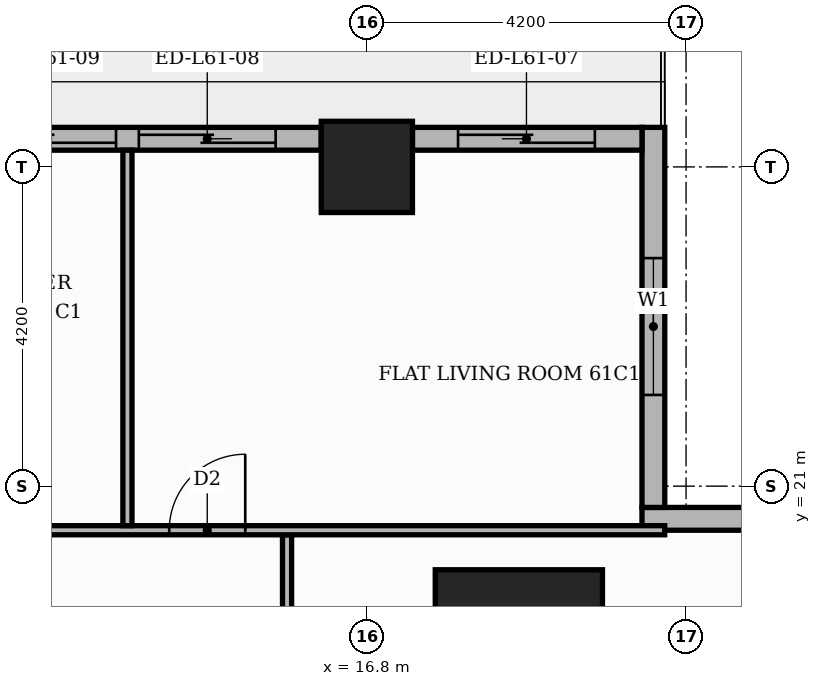
"""IFC4 building model, lengths in metres.
Left out: names, types, materials, properties, quantities, classifications, styles, units other than length and angle.
Written with IfcOpenShell. Run it as: python <this file> out.ifc"""

import sys

from ifc_helpers import new_model, si_unit, direction, frame, frame_2d, origin, origin_2d, place, context, subcontext, project, spatial, rectangle, extrude, element, fill, save


model = new_model("IFC4")
c1 = context("Model", 3, precision=1e-05, world=origin(), true_north=direction((0.0, 1.0)))
c2 = subcontext(c1, "Body", "Model", "MODEL_VIEW")
j1 = project(units=[si_unit("LENGTHUNIT", "METRE"), si_unit("PLANEANGLEUNIT", "RADIAN")], contexts=[c1])
p1 = place(None, origin())
s1 = spatial("IfcSite", under=j1, at=p1, CompositionType="ELEMENT")
p2 = place(p1, origin())
s2 = spatial("IfcBuilding", under=s1, at=p2, CompositionType="ELEMENT")
p3 = place(p2, frame((0.0, 0.0, 256.2)))
s3 = spatial("IfcBuildingStorey", under=s2, at=p3, CompositionType="ELEMENT", Elevation=256.2)
p4 = place(p3, frame((18.8, 18.8, 0.0), z_axis=(0.0, 0.0, 1.0), x_axis=(1.0, 0.0, 0.0)))
e1 = element("IfcColumn", 1, at=p4, inside=s3, PredefinedType="COLUMN", context=c2, shape_type="SweptSolid", body=[
    extrude(rectangle(XDim=2.2, YDim=2.2, at=origin_2d()), origin(), (0.0, 0.0, 1.0), 3.9),
])
p5 = place(p3, frame((16.8, 25.2, 0.0), z_axis=(0.0, 0.0, 1.0), x_axis=(1.0, 0.0, 0.0)))
e2 = element("IfcColumn", 2, at=p5, inside=s3, PredefinedType="COLUMN", context=c2, shape_type="SweptSolid", body=[
    extrude(rectangle(XDim=1.2, YDim=1.2, at=origin_2d()), origin(), (0.0, 0.0, 1.0), 3.9),
])
p6 = place(p3, frame((25.42, 20.57, 0.0), z_axis=(0.0, 0.0, 1.0), x_axis=(-1.0, 0.0, 0.0)))
e3 = element("IfcWall", 3, at=p6, inside=s3, PredefinedType="STANDARD", context=c2, shape_type="SweptSolid", body=[
    extrude(rectangle(XDim=5.0, YDim=0.3, at=frame_2d((2.5, 0.0))), origin(), (0.0, 0.0, 1.0), 3.48),
])
p7 = place(p6, frame((1.42, 0.0, 0.9)))
e4 = element("IfcOpeningElement", 4, at=p7, cuts=e3, PredefinedType="OPENING", context=c2, shape_type="SweptSolid", body=[
    extrude(rectangle(XDim=1.8, YDim=2.1, at=frame_2d((0.9, 1.05))), frame((0.0, 0.16, 0.0), z_axis=(0.0, -1.0, 0.0), x_axis=(1.0, 0.0, 0.0)), (0.0, 0.0, 1.0), 0.32),
])
p8 = place(p3, frame((20.57, 20.72, 0.0), z_axis=(0.0, 0.0, 1.0), x_axis=(0.0, 1.0, 0.0)))
e5 = element("IfcWall", 5, at=p8, inside=s3, PredefinedType="STANDARD", context=c2, shape_type="SweptSolid", body=[
    extrude(rectangle(XDim=5.0, YDim=0.3, at=frame_2d((2.5, 0.0))), origin(), (0.0, 0.0, 1.0), 3.48),
])
p9 = place(p8, frame((1.48, 0.0, 0.9)))
e6 = element("IfcOpeningElement", 6, at=p9, cuts=e5, PredefinedType="OPENING", context=c2, shape_type="SweptSolid", body=[
    extrude(rectangle(XDim=1.8, YDim=2.1, at=frame_2d((0.9, 1.05))), frame((0.0, 0.16, 0.0), z_axis=(0.0, -1.0, 0.0), x_axis=(1.0, 0.0, 0.0)), (0.0, 0.0, 1.0), 0.32),
])
p10 = place(p3, frame((20.42, 25.57, 0.0), z_axis=(0.0, 0.0, 1.0), x_axis=(-1.0, 0.0, 0.0)))
e7 = element("IfcWall", 7, at=p10, inside=s3, PredefinedType="STANDARD", context=c2, shape_type="SweptSolid", body=[
    extrude(rectangle(XDim=3.02, YDim=0.3, at=frame_2d((1.51, 0.0))), origin(), (0.0, 0.0, 1.0), 3.48),
])
p11 = place(p10, frame((0.62, 0.0, 0.0)))
e8 = element("IfcOpeningElement", 8, at=p11, cuts=e7, PredefinedType="OPENING", context=c2, shape_type="SweptSolid", body=[
    extrude(rectangle(XDim=1.8, YDim=2.4, at=frame_2d((0.9, 1.2))), frame((0.0, 0.16, 0.0), z_axis=(0.0, -1.0, 0.0), x_axis=(1.0, 0.0, 0.0)), (0.0, 0.0, 1.0), 0.32),
])
p12 = place(p3, frame((16.2, 25.57, 0.0), z_axis=(0.0, 0.0, 1.0), x_axis=(-1.0, 0.0, 0.0)))
e9 = element("IfcWall", 9, at=p12, inside=s3, PredefinedType="STANDARD", context=c2, shape_type="SweptSolid", body=[
    extrude(rectangle(XDim=7.2, YDim=0.3, at=frame_2d((3.6, 0.0))), origin(), (0.0, 0.0, 1.0), 3.48),
])
p13 = place(p12, frame((0.6, 0.0, 0.0)))
e10 = element("IfcOpeningElement", 10, at=p13, cuts=e9, PredefinedType="OPENING", context=c2, shape_type="SweptSolid", body=[
    extrude(rectangle(XDim=1.8, YDim=2.4, at=frame_2d((0.9, 1.2))), frame((0.0, 0.16, 0.0), z_axis=(0.0, -1.0, 0.0), x_axis=(1.0, 0.0, 0.0)), (0.0, 0.0, 1.0), 0.32),
])
p14 = place(p12, frame((2.7, 0.0, 0.0)))
e11 = element("IfcOpeningElement", 11, at=p14, cuts=e9, PredefinedType="OPENING", context=c2, shape_type="SweptSolid", body=[
    extrude(rectangle(XDim=1.8, YDim=2.4, at=frame_2d((0.9, 1.2))), frame((0.0, 0.16, 0.0), z_axis=(0.0, -1.0, 0.0), x_axis=(1.0, 0.0, 0.0)), (0.0, 0.0, 1.0), 0.32),
])
p15 = place(p12, frame((4.8, 0.0, 0.9)))
e12 = element("IfcOpeningElement", 12, at=p15, cuts=e9, PredefinedType="OPENING", context=c2, shape_type="SweptSolid", body=[
    extrude(rectangle(XDim=1.8, YDim=2.1, at=frame_2d((0.9, 1.05))), frame((0.0, 0.16, 0.0), z_axis=(0.0, -1.0, 0.0), x_axis=(1.0, 0.0, 0.0)), (0.0, 0.0, 1.0), 0.32),
])
p16 = place(p3, frame((15.75, 13.75, 0.0), z_axis=(0.0, 0.0, 1.0), x_axis=(0.0, 1.0, 0.0)))
e13 = element("IfcWall", 13, at=p16, inside=s3, PredefinedType="PARTITIONING", context=c2, shape_type="SweptSolid", body=[
    extrude(rectangle(XDim=6.61, YDim=0.12, at=frame_2d((3.305, 0.0))), origin(), (0.0, 0.0, 1.0), 3.48),
])
p17 = place(p16, frame((2.785, 0.0, 0.0)))
e14 = element("IfcOpeningElement", 14, at=p17, cuts=e13, PredefinedType="OPENING", context=c2, shape_type="SweptSolid", body=[
    extrude(rectangle(XDim=1.0, YDim=2.1, at=frame_2d((0.5, 1.05))), frame((0.0, 0.07, 0.0), z_axis=(0.0, -1.0, 0.0), x_axis=(1.0, 0.0, 0.0)), (0.0, 0.0, 1.0), 0.14),
])
p18 = place(p3, frame((5.35, 20.42, 0.0), z_axis=(0.0, 0.0, 1.0), x_axis=(1.0, 0.0, 0.0)))
e15 = element("IfcWall", 15, at=p18, inside=s3, PredefinedType="PARTITIONING", context=c2, shape_type="SweptSolid", body=[
    extrude(rectangle(XDim=15.369, YDim=0.12, at=frame_2d((7.685, 0.0))), origin(), (0.0, 0.0, 1.0), 3.48),
])
p19 = place(p18, frame((8.85, 0.0, 0.0)))
e16 = element("IfcOpeningElement", 16, at=p19, cuts=e15, PredefinedType="OPENING", context=c2, shape_type="SweptSolid", body=[
    extrude(rectangle(XDim=1.0, YDim=2.1, at=frame_2d((0.5, 1.05))), frame((0.0, 0.07, 0.0), z_axis=(0.0, -1.0, 0.0), x_axis=(1.0, 0.0, 0.0)), (0.0, 0.0, 1.0), 0.14),
])
p20 = place(p18, frame((5.75, 0.0, 0.0)))
e17 = element("IfcOpeningElement", 17, at=p20, cuts=e15, PredefinedType="OPENING", context=c2, shape_type="SweptSolid", body=[
    extrude(rectangle(XDim=0.9, YDim=2.1, at=frame_2d((0.45, 1.05))), frame((0.0, 0.07, 0.0), z_axis=(0.0, -1.0, 0.0), x_axis=(1.0, 0.0, 0.0)), (0.0, 0.0, 1.0), 0.14),
])
p21 = place(p3, frame((13.65, 20.48, 0.0), z_axis=(0.0, 0.0, 1.0), x_axis=(0.0, 1.0, 0.0)))
e18 = element("IfcWall", 18, at=p21, inside=s3, PredefinedType="PARTITIONING", context=c2, shape_type="SweptSolid", body=[
    extrude(rectangle(XDim=4.94, YDim=0.12, at=frame_2d((2.47, 0.0))), origin(), (0.0, 0.0, 1.0), 3.48),
])
p22 = place(p9, origin())
e19 = element("IfcWindow", 19, at=p22, inside=s3, PartitioningType="SINGLE_PANEL", PredefinedType="WINDOW", context=c2, shape_type="SweptSolid", body=[
    extrude(rectangle(XDim=1.8, YDim=2.1, at=frame_2d((0.9, 1.05))), frame((0.0, 0.03, 0.0), z_axis=(0.0, -1.0, 0.0), x_axis=(1.0, 0.0, 0.0)), (0.0, 0.0, 1.0), 0.06),
])
fill(e6, e19)
p23 = place(p11, origin())
e20 = element("IfcDoor", 20, at=p23, inside=s3, OperationType="SLIDING_TO_RIGHT", PredefinedType="DOOR", context=c2, shape_type="SweptSolid", body=[
    extrude(rectangle(XDim=1.8, YDim=2.4, at=frame_2d((0.9, 1.2))), frame((0.0, 0.025, 0.0), z_axis=(0.0, -1.0, 0.0), x_axis=(1.0, 0.0, 0.0)), (0.0, 0.0, 1.0), 0.05),
])
fill(e8, e20)
p24 = place(p13, origin())
e21 = element("IfcDoor", 21, at=p24, inside=s3, OperationType="SLIDING_TO_LEFT", PredefinedType="DOOR", context=c2, shape_type="SweptSolid", body=[
    extrude(rectangle(XDim=1.8, YDim=2.4, at=frame_2d((0.9, 1.2))), frame((0.0, 0.025, 0.0), z_axis=(0.0, -1.0, 0.0), x_axis=(1.0, 0.0, 0.0)), (0.0, 0.0, 1.0), 0.05),
])
fill(e10, e21)
p25 = place(p14, origin())
e22 = element("IfcDoor", 22, at=p25, inside=s3, OperationType="SLIDING_TO_RIGHT", PredefinedType="DOOR", context=c2, shape_type="SweptSolid", body=[
    extrude(rectangle(XDim=1.8, YDim=2.4, at=frame_2d((0.9, 1.2))), frame((0.0, 0.025, 0.0), z_axis=(0.0, -1.0, 0.0), x_axis=(1.0, 0.0, 0.0)), (0.0, 0.0, 1.0), 0.05),
])
fill(e11, e22)
p26 = place(p19, origin())
e23 = element("IfcDoor", 23, at=p26, inside=s3, OperationType="SINGLE_SWING_RIGHT", PredefinedType="DOOR", context=c2, shape_type="SweptSolid", body=[
    extrude(rectangle(XDim=1.0, YDim=2.1, at=frame_2d((0.5, 1.05))), frame((0.0, 0.025, 0.0), z_axis=(0.0, -1.0, 0.0), x_axis=(1.0, 0.0, 0.0)), (0.0, 0.0, 1.0), 0.05),
])
fill(e16, e23)
save(model, sys.argv[1])
